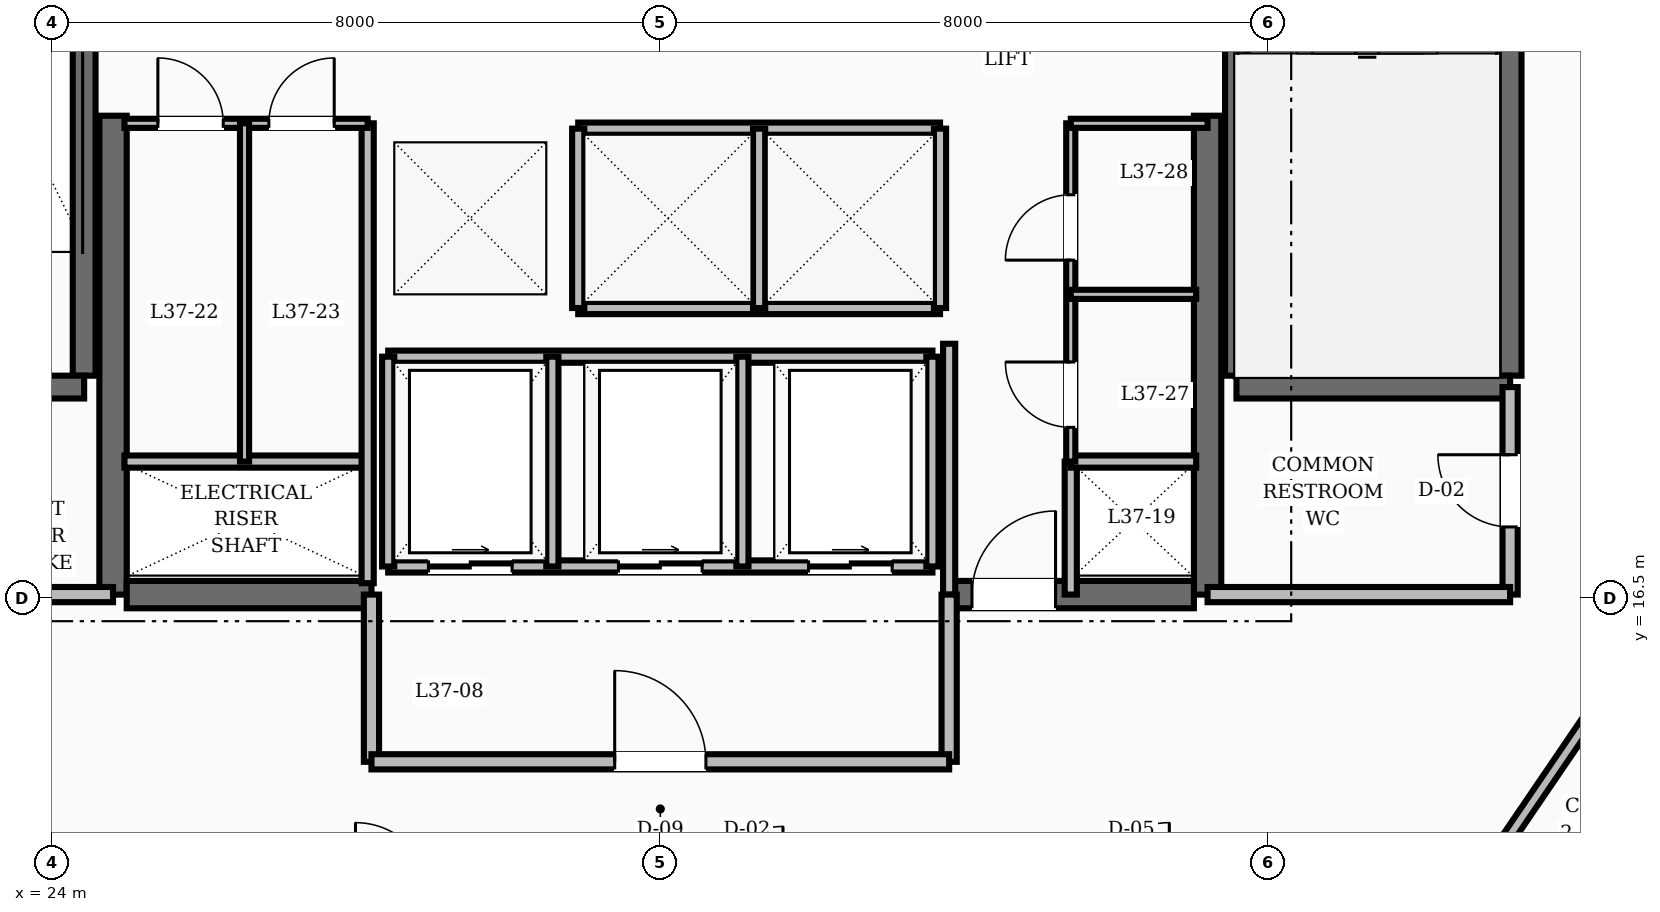
"""IFC4 building model, lengths in metres.
Left out: names, types, materials, properties, quantities, classifications, styles, units other than length and angle.
Written with IfcOpenShell. Run it as: python <this file> out.ifc"""

import sys

from ifc_helpers import new_model, si_unit, direction, frame, frame_2d, origin, place, context, subcontext, project, spatial, rectangle, extrude, element, fill, save


model = new_model("IFC4")
c1 = context("Model", 3, precision=1e-05, world=origin(), true_north=direction((0.0, 1.0)))
c2 = subcontext(c1, "Body", "Model", "MODEL_VIEW")
j1 = project(units=[si_unit("LENGTHUNIT", "METRE"), si_unit("PLANEANGLEUNIT", "RADIAN")], contexts=[c1])
p1 = place(None, origin())
s1 = spatial("IfcSite", under=j1, at=p1, CompositionType="ELEMENT")
p2 = place(p1, origin())
s2 = spatial("IfcBuilding", under=s1, at=p2, CompositionType="ELEMENT")
p3 = place(p2, frame((0.0, 0.0, 146.0)))
s3 = spatial("IfcBuildingStorey", under=s2, at=p3, CompositionType="ELEMENT", Elevation=146.0)
for number, where, z_axis, x_axis in (
    (1, (24.8, 16.55, 0.0), (0.0, 0.0, 1.0), (0.0, 1.0, 0.0)),
    (2, (39.2, 16.55, 0.0), (0.0, 0.0, 1.0), (0.0, 1.0, 0.0)),
):
    element("IfcWall", number, at=place(p3, frame(where, z_axis=z_axis, x_axis=x_axis)), inside=s3, PredefinedType="SHEAR", context=c2, shape_type="SweptSolid", body=[
        extrude(rectangle(XDim=6.3, YDim=0.36, at=frame_2d((3.15, 0.0))), origin(), (0.0, 0.0, 1.0), 3.6),
    ])
p4 = place(p3, frame((24.98, 16.55, 0.0), z_axis=(0.0, 0.0, 1.0), x_axis=(1.0, 0.0, 0.0)))
e3 = element("IfcWall", 3, at=p4, inside=s3, PredefinedType="SHEAR", context=c2, shape_type="SweptSolid", body=[
    extrude(rectangle(XDim=3.22, YDim=0.36, at=frame_2d((1.61, 0.0))), origin(), (0.0, 0.0, 1.0), 3.6),
])
p5 = place(p3, frame((35.8, 16.55, 0.0), z_axis=(0.0, 0.0, 1.0), x_axis=(1.0, 0.0, 0.0)))
e4 = element("IfcWall", 4, at=p5, inside=s3, PredefinedType="SHEAR", context=c2, shape_type="SweptSolid", body=[
    extrude(rectangle(XDim=3.22, YDim=0.36, at=frame_2d((1.61, 0.0))), origin(), (0.0, 0.0, 1.0), 3.6),
])
p6 = place(p5, frame((0.3, 0.0, 0.0)))
e5 = element("IfcOpeningElement", 5, at=p6, cuts=e4, PredefinedType="OPENING", context=c2, shape_type="SweptSolid", body=[
    extrude(rectangle(XDim=1.1, YDim=2.1, at=frame_2d((0.55, 1.05))), frame((0.0, 0.19, 0.0), z_axis=(0.0, -1.0, 0.0), x_axis=(1.0, 0.0, 0.0)), (0.0, 0.0, 1.0), 0.38),
])
p7 = place(p3, frame((24.42, 19.43, 0.0), z_axis=(0.0, 0.0, 1.0), x_axis=(0.0, 1.0, 0.0)))
e6 = element("IfcWall", 6, at=p7, inside=s3, PredefinedType="SHEAR", context=c2, shape_type="SweptSolid", body=[
    extrude(rectangle(XDim=8.74, YDim=0.3, at=frame_2d((4.37, 0.0))), origin(), (0.0, 0.0, 1.0), 3.6),
])
p8 = place(p3, frame((20.82, 19.28, 0.0), z_axis=(0.0, 0.0, 1.0), x_axis=(1.0, 0.0, 0.0)))
e7 = element("IfcWall", 7, at=p8, inside=s3, PredefinedType="SHEAR", context=c2, shape_type="SweptSolid", body=[
    extrude(rectangle(XDim=3.6, YDim=0.3, at=frame_2d((1.8, 0.0))), origin(), (0.0, 0.0, 1.0), 3.6),
])
p9 = place(p8, frame((1.3, 0.0, 0.0)))
e8 = element("IfcOpeningElement", 8, at=p9, cuts=e7, PredefinedType="OPENING", context=c2, shape_type="SweptSolid", body=[
    extrude(rectangle(XDim=1.1, YDim=2.1, at=frame_2d((0.55, 1.05))), frame((0.0, 0.16, 0.0), z_axis=(0.0, -1.0, 0.0), x_axis=(1.0, 0.0, 0.0)), (0.0, 0.0, 1.0), 0.32),
])
for number, where, z_axis, x_axis in (
    (9, (43.18, 19.43, 0.0), (0.0, 0.0, 1.0), (0.0, 1.0, 0.0)),
    (10, (39.58, 19.43, 0.0), (0.0, 0.0, 1.0), (0.0, 1.0, 0.0)),
):
    element("IfcWall", number, at=place(p3, frame(where, z_axis=z_axis, x_axis=x_axis)), inside=s3, PredefinedType="SHEAR", context=c2, shape_type="SweptSolid", body=[
        extrude(rectangle(XDim=8.74, YDim=0.3, at=frame_2d((4.37, 0.0))), origin(), (0.0, 0.0, 1.0), 3.6),
    ])
p10 = place(p3, frame((39.58, 19.28, 0.0), z_axis=(0.0, 0.0, 1.0), x_axis=(1.0, 0.0, 0.0)))
e11 = element("IfcWall", 11, at=p10, inside=s3, PredefinedType="SHEAR", context=c2, shape_type="SweptSolid", body=[
    extrude(rectangle(XDim=3.6, YDim=0.3, at=frame_2d((1.8, 0.0))), origin(), (0.0, 0.0, 1.0), 3.6),
])
p11 = place(p3, frame((20.82, 16.55, 0.0), z_axis=(0.0, 0.0, 1.0), x_axis=(1.0, 0.0, 0.0)))
e12 = element("IfcWall", 12, at=p11, inside=s3, PredefinedType="SOLIDWALL", context=c2, shape_type="SweptSolid", body=[
    extrude(rectangle(XDim=3.98, YDim=0.2, at=frame_2d((1.99, 0.0))), origin(), (0.0, 0.0, 1.0), 2.8),
])
p12 = place(p3, frame((43.18, 16.55, 0.0), z_axis=(0.0, 0.0, 1.0), x_axis=(0.0, 1.0, 0.0)))
e13 = element("IfcWall", 13, at=p12, inside=s3, PredefinedType="SOLIDWALL", context=c2, shape_type="SweptSolid", body=[
    extrude(rectangle(XDim=2.73, YDim=0.2, at=frame_2d((1.365, 0.0))), origin(), (0.0, 0.0, 1.0), 2.8),
])
p13 = place(p12, frame((0.89, 0.0, 0.0)))
e14 = element("IfcOpeningElement", 14, at=p13, cuts=e13, PredefinedType="OPENING", context=c2, shape_type="SweptSolid", body=[
    extrude(rectangle(XDim=0.95, YDim=2.1, at=frame_2d((0.475, 1.05))), frame((0.0, 0.11, 0.0), z_axis=(0.0, -1.0, 0.0), x_axis=(1.0, 0.0, 0.0)), (0.0, 0.0, 1.0), 0.22),
])
p14 = place(p3, frame((39.2, 16.55, 0.0), z_axis=(0.0, 0.0, 1.0), x_axis=(1.0, 0.0, 0.0)))
e15 = element("IfcWall", 15, at=p14, inside=s3, PredefinedType="SOLIDWALL", context=c2, shape_type="SweptSolid", body=[
    extrude(rectangle(XDim=3.98, YDim=0.2, at=frame_2d((1.99, 0.0))), origin(), (0.0, 0.0, 1.0), 2.8),
])
p15 = place(p3, frame((35.8, 16.55, 0.0), z_axis=(0.0, 0.0, 1.0), x_axis=(0.0, 1.0, 0.0)))
e16 = element("IfcWall", 16, at=p15, inside=s3, PredefinedType="SOLIDWALL", context=c2, shape_type="SweptSolid", body=[
    extrude(rectangle(XDim=3.3, YDim=0.16, at=frame_2d((1.65, 0.0))), origin(), (0.0, 0.0, 1.0), 2.8),
])
p16 = place(p3, frame((37.4, 16.55, 0.0), z_axis=(0.0, 0.0, 1.0), x_axis=(0.0, 1.0, 0.0)))
e17 = element("IfcWall", 17, at=p16, inside=s3, PredefinedType="SOLIDWALL", context=c2, shape_type="SweptSolid", body=[
    extrude(rectangle(XDim=1.75, YDim=0.16, at=frame_2d((0.875, 0.0))), origin(), (0.0, 0.0, 1.0), 2.8),
])
for number, where, z_axis, x_axis in (
    (18, (28.2, 14.35, 0.0), (0.0, 0.0, 1.0), (0.0, 1.0, 0.0)),
    (19, (35.8, 14.35, 0.0), (0.0, 0.0, 1.0), (0.0, 1.0, 0.0)),
):
    element("IfcWall", number, at=place(p3, frame(where, z_axis=z_axis, x_axis=x_axis)), inside=s3, PredefinedType="SOLIDWALL", context=c2, shape_type="SweptSolid", body=[
        extrude(rectangle(XDim=2.2, YDim=0.2, at=frame_2d((1.1, 0.0))), origin(), (0.0, 0.0, 1.0), 2.8),
    ])
p17 = place(p3, frame((28.2, 14.35, 0.0), z_axis=(0.0, 0.0, 1.0), x_axis=(1.0, 0.0, 0.0)))
e20 = element("IfcWall", 20, at=p17, inside=s3, PredefinedType="SOLIDWALL", context=c2, shape_type="SweptSolid", body=[
    extrude(rectangle(XDim=7.6, YDim=0.2, at=frame_2d((3.8, 0.0))), origin(), (0.0, 0.0, 1.0), 2.8),
])
p18 = place(p17, frame((3.2, 0.0, 0.0)))
e21 = element("IfcOpeningElement", 21, at=p18, cuts=e20, PredefinedType="OPENING", context=c2, shape_type="SweptSolid", body=[
    extrude(rectangle(XDim=1.2, YDim=2.1, at=frame_2d((0.6, 1.05))), frame((0.0, 0.11, 0.0), z_axis=(0.0, -1.0, 0.0), x_axis=(1.0, 0.0, 0.0)), (0.0, 0.0, 1.0), 0.22),
])
for number, where, z_axis, x_axis in (
    (22, (30.92, 22.68, 0.0), (0.0, 0.0, 1.0), (1.0, 0.0, 0.0)),
    (23, (30.92, 20.32, 0.0), (0.0, 0.0, 1.0), (1.0, 0.0, 0.0)),
):
    element("IfcWall", number, at=place(p3, frame(where, z_axis=z_axis, x_axis=x_axis)), inside=s3, PredefinedType="SOLIDWALL", context=c2, shape_type="SweptSolid", body=[
        extrude(rectangle(XDim=4.76, YDim=0.16, at=frame_2d((2.38, 0.0))), origin(), (0.0, 0.0, 1.0), 2.8),
    ])
for number, where, z_axis, x_axis in (
    (24, (30.92, 20.32, 0.0), (0.0, 0.0, 1.0), (0.0, 1.0, 0.0)),
    (25, (33.3, 20.32, 0.0), (0.0, 0.0, 1.0), (0.0, 1.0, 0.0)),
    (26, (35.68, 20.32, 0.0), (0.0, 0.0, 1.0), (0.0, 1.0, 0.0)),
):
    element("IfcWall", number, at=place(p3, frame(where, z_axis=z_axis, x_axis=x_axis)), inside=s3, PredefinedType="SOLIDWALL", context=c2, shape_type="SweptSolid", body=[
        extrude(rectangle(XDim=2.36, YDim=0.16, at=frame_2d((1.18, 0.0))), origin(), (0.0, 0.0, 1.0), 2.8),
    ])
p19 = place(p3, frame((28.42, 16.92, 0.0), z_axis=(0.0, 0.0, 1.0), x_axis=(1.0, 0.0, 0.0)))
e27 = element("IfcWall", 27, at=p19, inside=s3, PredefinedType="SOLIDWALL", context=c2, shape_type="SweptSolid", body=[
    extrude(rectangle(XDim=7.16, YDim=0.16, at=frame_2d((3.58, 0.0))), origin(), (0.0, 0.0, 1.0), 2.8),
])
p20 = place(p19, frame((0.53, 0.0, 0.0)))
e28 = element("IfcOpeningElement", 28, at=p20, cuts=e27, PredefinedType="OPENING", context=c2, shape_type="SweptSolid", body=[
    extrude(rectangle(XDim=1.1, YDim=2.15, at=frame_2d((0.55, 1.075))), frame((0.0, 0.09, 0.0), z_axis=(0.0, -1.0, 0.0), x_axis=(1.0, 0.0, 0.0)), (0.0, 0.0, 1.0), 0.18),
])
p21 = place(p19, frame((3.03, 0.0, 0.0)))
e29 = element("IfcOpeningElement", 29, at=p21, cuts=e27, PredefinedType="OPENING", context=c2, shape_type="SweptSolid", body=[
    extrude(rectangle(XDim=1.1, YDim=2.15, at=frame_2d((0.55, 1.075))), frame((0.0, 0.09, 0.0), z_axis=(0.0, -1.0, 0.0), x_axis=(1.0, 0.0, 0.0)), (0.0, 0.0, 1.0), 0.18),
])
p22 = place(p19, frame((5.53, 0.0, 0.0)))
e30 = element("IfcOpeningElement", 30, at=p22, cuts=e27, PredefinedType="OPENING", context=c2, shape_type="SweptSolid", body=[
    extrude(rectangle(XDim=1.1, YDim=2.15, at=frame_2d((0.55, 1.075))), frame((0.0, 0.09, 0.0), z_axis=(0.0, -1.0, 0.0), x_axis=(1.0, 0.0, 0.0)), (0.0, 0.0, 1.0), 0.18),
])
p23 = place(p3, frame((28.42, 19.68, 0.0), z_axis=(0.0, 0.0, 1.0), x_axis=(1.0, 0.0, 0.0)))
e31 = element("IfcWall", 31, at=p23, inside=s3, PredefinedType="SOLIDWALL", context=c2, shape_type="SweptSolid", body=[
    extrude(rectangle(XDim=7.16, YDim=0.16, at=frame_2d((3.58, 0.0))), origin(), (0.0, 0.0, 1.0), 2.8),
])
for number, where, z_axis, x_axis in (
    (32, (28.42, 16.92, 0.0), (0.0, 0.0, 1.0), (0.0, 1.0, 0.0)),
    (33, (30.58, 16.92, 0.0), (0.0, 0.0, 1.0), (0.0, 1.0, 0.0)),
    (34, (33.08, 16.92, 0.0), (0.0, 0.0, 1.0), (0.0, 1.0, 0.0)),
    (35, (35.58, 16.92, 0.0), (0.0, 0.0, 1.0), (0.0, 1.0, 0.0)),
):
    element("IfcWall", number, at=place(p3, frame(where, z_axis=z_axis, x_axis=x_axis)), inside=s3, PredefinedType="SOLIDWALL", context=c2, shape_type="SweptSolid", body=[
        extrude(rectangle(XDim=2.76, YDim=0.16, at=frame_2d((1.38, 0.0))), origin(), (0.0, 0.0, 1.0), 2.8),
    ])
p24 = place(p3, frame((24.95, 18.3, 0.0), z_axis=(0.0, 0.0, 1.0), x_axis=(1.0, 0.0, 0.0)))
e36 = element("IfcWall", 36, at=p24, inside=s3, PredefinedType="SOLIDWALL", context=c2, shape_type="SweptSolid", body=[
    extrude(rectangle(XDim=3.2, YDim=0.16, at=frame_2d((1.6, 0.0))), origin(), (0.0, 0.0, 1.0), 2.8),
])
p25 = place(p3, frame((28.15, 16.7, 0.0), z_axis=(0.0, 0.0, 1.0), x_axis=(0.0, 1.0, 0.0)))
e37 = element("IfcWall", 37, at=p25, inside=s3, PredefinedType="SOLIDWALL", context=c2, shape_type="SweptSolid", body=[
    extrude(rectangle(XDim=6.05, YDim=0.16, at=frame_2d((3.025, 0.0))), origin(), (0.0, 0.0, 1.0), 2.8),
])
p26 = place(p3, frame((37.4, 18.3, 0.0), z_axis=(0.0, 0.0, 1.0), x_axis=(1.0, 0.0, 0.0)))
e38 = element("IfcWall", 38, at=p26, inside=s3, PredefinedType="SOLIDWALL", context=c2, shape_type="SweptSolid", body=[
    extrude(rectangle(XDim=1.65, YDim=0.16, at=frame_2d((0.825, 0.0))), origin(), (0.0, 0.0, 1.0), 2.8),
])
p27 = place(p3, frame((24.95, 22.75, 0.0), z_axis=(0.0, 0.0, 1.0), x_axis=(1.0, 0.0, 0.0)))
e39 = element("IfcWall", 39, at=p27, inside=s3, PredefinedType="PARTITIONING", context=c2, shape_type="SweptSolid", body=[
    extrude(rectangle(XDim=3.2, YDim=0.12, at=frame_2d((1.6, 0.0))), origin(), (0.0, 0.0, 1.0), 2.8),
])
p28 = place(p27, frame((0.44, 0.0, 0.0)))
e40 = element("IfcOpeningElement", 40, at=p28, cuts=e39, PredefinedType="OPENING", context=c2, shape_type="SweptSolid", body=[
    extrude(rectangle(XDim=0.86, YDim=2.1, at=frame_2d((0.43, 1.05))), frame((0.0, 0.07, 0.0), z_axis=(0.0, -1.0, 0.0), x_axis=(1.0, 0.0, 0.0)), (0.0, 0.0, 1.0), 0.14),
])
p29 = place(p27, frame((1.9, 0.0, 0.0)))
e41 = element("IfcOpeningElement", 41, at=p29, cuts=e39, PredefinedType="OPENING", context=c2, shape_type="SweptSolid", body=[
    extrude(rectangle(XDim=0.86, YDim=2.1, at=frame_2d((0.43, 1.05))), frame((0.0, 0.07, 0.0), z_axis=(0.0, -1.0, 0.0), x_axis=(1.0, 0.0, 0.0)), (0.0, 0.0, 1.0), 0.14),
])
p30 = place(p3, frame((37.4, 18.3, 0.0), z_axis=(0.0, 0.0, 1.0), x_axis=(0.0, 1.0, 0.0)))
e42 = element("IfcWall", 42, at=p30, inside=s3, PredefinedType="PARTITIONING", context=c2, shape_type="SweptSolid", body=[
    extrude(rectangle(XDim=4.45, YDim=0.12, at=frame_2d((2.225, 0.0))), origin(), (0.0, 0.0, 1.0), 2.8),
])
p31 = place(p30, frame((0.45, 0.0, 0.0)))
e43 = element("IfcOpeningElement", 43, at=p31, cuts=e42, PredefinedType="OPENING", context=c2, shape_type="SweptSolid", body=[
    extrude(rectangle(XDim=0.86, YDim=2.1, at=frame_2d((0.43, 1.05))), frame((0.0, 0.07, 0.0), z_axis=(0.0, -1.0, 0.0), x_axis=(1.0, 0.0, 0.0)), (0.0, 0.0, 1.0), 0.14),
])
p32 = place(p30, frame((2.65, 0.0, 0.0)))
e44 = element("IfcOpeningElement", 44, at=p32, cuts=e42, PredefinedType="OPENING", context=c2, shape_type="SweptSolid", body=[
    extrude(rectangle(XDim=0.86, YDim=2.1, at=frame_2d((0.43, 1.05))), frame((0.0, 0.07, 0.0), z_axis=(0.0, -1.0, 0.0), x_axis=(1.0, 0.0, 0.0)), (0.0, 0.0, 1.0), 0.14),
])
p33 = place(p3, frame((37.4, 22.75, 0.0), z_axis=(0.0, 0.0, 1.0), x_axis=(1.0, 0.0, 0.0)))
e45 = element("IfcWall", 45, at=p33, inside=s3, PredefinedType="PARTITIONING", context=c2, shape_type="SweptSolid", body=[
    extrude(rectangle(XDim=1.8, YDim=0.12, at=frame_2d((0.9, 0.0))), origin(), (0.0, 0.0, 1.0), 2.8),
])
p34 = place(p3, frame((26.53, 18.3, 0.0), z_axis=(0.0, 0.0, 1.0), x_axis=(0.0, 1.0, 0.0)))
e46 = element("IfcWall", 46, at=p34, inside=s3, PredefinedType="PARTITIONING", context=c2, shape_type="SweptSolid", body=[
    extrude(rectangle(XDim=4.45, YDim=0.12, at=frame_2d((2.225, 0.0))), origin(), (0.0, 0.0, 1.0), 2.8),
])
p35 = place(p3, frame((37.4, 20.5, 0.0), z_axis=(0.0, 0.0, 1.0), x_axis=(1.0, 0.0, 0.0)))
e47 = element("IfcWall", 47, at=p35, inside=s3, PredefinedType="PARTITIONING", context=c2, shape_type="SweptSolid", body=[
    extrude(rectangle(XDim=1.65, YDim=0.12, at=frame_2d((0.825, 0.0))), origin(), (0.0, 0.0, 1.0), 2.8),
])
p36 = place(p3, frame((42.95, 13.05, 0.0), z_axis=(0.0, 0.0, 1.0), x_axis=(0.562674669208, 0.826678423955, 0.0)))
e48 = element("IfcWall", 48, at=p36, inside=s3, PredefinedType="SOLIDWALL", context=c2, shape_type="SweptSolid", body=[
    extrude(rectangle(XDim=3.021, YDim=0.16, at=frame_2d((1.511, 0.0))), origin(), (0.0, 0.0, 1.0), 2.8),
])
p37 = place(p13, origin())
e49 = element("IfcDoor", 49, at=p37, inside=s3, OperationType="SINGLE_SWING_RIGHT", PredefinedType="DOOR", context=c2, shape_type="SweptSolid", body=[
    extrude(rectangle(XDim=0.95, YDim=2.1, at=frame_2d((0.475, 1.05))), frame((0.0, 0.025, 0.0), z_axis=(0.0, -1.0, 0.0), x_axis=(1.0, 0.0, 0.0)), (0.0, 0.0, 1.0), 0.05),
])
fill(e14, e49)
p38 = place(p6, origin())
e50 = element("IfcDoor", 50, at=p38, inside=s3, OperationType="SINGLE_SWING_RIGHT", PredefinedType="DOOR", context=c2, shape_type="SweptSolid", body=[
    extrude(rectangle(XDim=1.1, YDim=2.1, at=frame_2d((0.55, 1.05))), frame((0.0, 0.025, 0.0), z_axis=(0.0, -1.0, 0.0), x_axis=(1.0, 0.0, 0.0)), (0.0, 0.0, 1.0), 0.05),
])
fill(e5, e50)
p39 = place(p18, origin())
e51 = element("IfcDoor", 51, at=p39, inside=s3, OperationType="SINGLE_SWING_LEFT", PredefinedType="DOOR", context=c2, shape_type="SweptSolid", body=[
    extrude(rectangle(XDim=1.2, YDim=2.1, at=frame_2d((0.6, 1.05))), frame((0.0, 0.025, 0.0), z_axis=(0.0, -1.0, 0.0), x_axis=(1.0, 0.0, 0.0)), (0.0, 0.0, 1.0), 0.05),
])
fill(e21, e51)
p40 = place(p20, origin())
e52 = element("IfcDoor", 52, at=p40, inside=s3, OperationType="SLIDING_TO_RIGHT", PredefinedType="DOOR", context=c2, shape_type="SweptSolid", body=[
    extrude(rectangle(XDim=1.1, YDim=2.15, at=frame_2d((0.55, 1.075))), frame((0.0, 0.025, 0.0), z_axis=(0.0, -1.0, 0.0), x_axis=(1.0, 0.0, 0.0)), (0.0, 0.0, 1.0), 0.05),
])
fill(e28, e52)
p41 = place(p21, origin())
e53 = element("IfcDoor", 53, at=p41, inside=s3, OperationType="SLIDING_TO_RIGHT", PredefinedType="DOOR", context=c2, shape_type="SweptSolid", body=[
    extrude(rectangle(XDim=1.1, YDim=2.15, at=frame_2d((0.55, 1.075))), frame((0.0, 0.025, 0.0), z_axis=(0.0, -1.0, 0.0), x_axis=(1.0, 0.0, 0.0)), (0.0, 0.0, 1.0), 0.05),
])
fill(e29, e53)
p42 = place(p22, origin())
e54 = element("IfcDoor", 54, at=p42, inside=s3, OperationType="SLIDING_TO_RIGHT", PredefinedType="DOOR", context=c2, shape_type="SweptSolid", body=[
    extrude(rectangle(XDim=1.1, YDim=2.15, at=frame_2d((0.55, 1.075))), frame((0.0, 0.025, 0.0), z_axis=(0.0, -1.0, 0.0), x_axis=(1.0, 0.0, 0.0)), (0.0, 0.0, 1.0), 0.05),
])
fill(e30, e54)
p43 = place(p28, origin())
e55 = element("IfcDoor", 55, at=p43, inside=s3, OperationType="SINGLE_SWING_LEFT", PredefinedType="DOOR", context=c2, shape_type="SweptSolid", body=[
    extrude(rectangle(XDim=0.86, YDim=2.1, at=frame_2d((0.43, 1.05))), frame((0.0, 0.025, 0.0), z_axis=(0.0, -1.0, 0.0), x_axis=(1.0, 0.0, 0.0)), (0.0, 0.0, 1.0), 0.05),
])
fill(e40, e55)
p44 = place(p29, origin())
e56 = element("IfcDoor", 56, at=p44, inside=s3, OperationType="SINGLE_SWING_RIGHT", PredefinedType="DOOR", context=c2, shape_type="SweptSolid", body=[
    extrude(rectangle(XDim=0.86, YDim=2.1, at=frame_2d((0.43, 1.05))), frame((0.0, 0.025, 0.0), z_axis=(0.0, -1.0, 0.0), x_axis=(1.0, 0.0, 0.0)), (0.0, 0.0, 1.0), 0.05),
])
fill(e41, e56)
p45 = place(p31, origin())
e57 = element("IfcDoor", 57, at=p45, inside=s3, OperationType="SINGLE_SWING_RIGHT", PredefinedType="DOOR", context=c2, shape_type="SweptSolid", body=[
    extrude(rectangle(XDim=0.86, YDim=2.1, at=frame_2d((0.43, 1.05))), frame((0.0, 0.025, 0.0), z_axis=(0.0, -1.0, 0.0), x_axis=(1.0, 0.0, 0.0)), (0.0, 0.0, 1.0), 0.05),
])
fill(e43, e57)
p46 = place(p32, origin())
e58 = element("IfcDoor", 58, at=p46, inside=s3, OperationType="SINGLE_SWING_LEFT", PredefinedType="DOOR", context=c2, shape_type="SweptSolid", body=[
    extrude(rectangle(XDim=0.86, YDim=2.1, at=frame_2d((0.43, 1.05))), frame((0.0, 0.025, 0.0), z_axis=(0.0, -1.0, 0.0), x_axis=(1.0, 0.0, 0.0)), (0.0, 0.0, 1.0), 0.05),
])
fill(e44, e58)
save(model, sys.argv[1])
